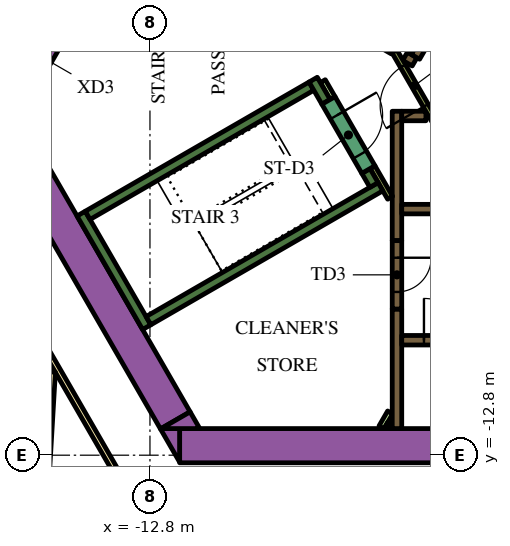
"""IFC4 building model, lengths in metres.
Left out: names, types, materials, properties, quantities, classifications, styles, units other than length and angle.
Written with IfcOpenShell. Run it as: python <this file> out.ifc"""

import sys

from ifc_helpers import new_model, si_unit, direction, frame, frame_2d, origin, place, context, subcontext, project, spatial, polyline, rectangle, outline, extrude, element, fill, save


model = new_model("IFC4")
c1 = context("Model", 3, precision=1e-05, world=origin(), true_north=direction((0.0, 1.0)))
c2 = subcontext(c1, "Body", "Model", "MODEL_VIEW")
j1 = project(units=[si_unit("LENGTHUNIT", "METRE"), si_unit("PLANEANGLEUNIT", "RADIAN")], contexts=[c1])
p1 = place(None, origin())
s1 = spatial("IfcSite", under=j1, at=p1, CompositionType="ELEMENT")
p2 = place(p1, origin())
s2 = spatial("IfcBuilding", under=s1, at=p2, CompositionType="ELEMENT")
p3 = place(p2, frame((0.0, 0.0, 114.9)))
s3 = spatial("IfcBuildingStorey", under=s2, at=p3, CompositionType="ELEMENT", Elevation=114.9)
p4 = place(p3, frame((-12.019, -12.55, 0.0), z_axis=(0.0, 0.0, 1.0), x_axis=(1.0, 0.0, 0.0)))
e1 = element("IfcWall", 1, at=p4, inside=s3, PredefinedType="SOLIDWALL", context=c2, shape_type="SweptSolid", body=[
    extrude(rectangle(XDim=22.083, YDim=0.9, at=frame_2d((11.042, 0.0))), origin(), (0.0, 0.0, 1.0), 3.9),
])
p5 = place(p3, origin())
e2 = element("IfcWall", 2, at=p5, inside=s3, PredefinedType="SOLIDWALL", context=c2, shape_type="SweptSolid", body=[
    extrude(outline(polyline([(-12.529, -12.1), (-12.021, -12.1), (-12.021, -12.98), (-12.529, -12.1)])), origin(), (0.0, 0.0, 1.0), 3.9),
])
p6 = place(p3, frame((-12.134, -11.883, 0.0), z_axis=(0.0, 0.0, 1.0), x_axis=(-0.500005339912, 0.866022320763, 0.0)))
e3 = element("IfcWall", 3, at=p6, inside=s3, PredefinedType="SOLIDWALL", context=c2, shape_type="SweptSolid", body=[
    extrude(rectangle(XDim=9.488, YDim=0.9, at=frame_2d((4.744, 0.0))), origin(), (0.0, 0.0, 1.0), 3.9),
])
e4 = element("IfcWall", 4, at=p5, inside=s3, PredefinedType="SOLIDWALL", context=c2, shape_type="SweptSolid", body=[
    extrude(outline(polyline([(-11.489, -12.1), (-12.505, -12.1), (-11.743, -11.66), (-11.489, -12.1)])), origin(), (0.0, 0.0, 1.0), 3.9),
])
p7 = place(p3, frame((-12.885, -9.431, 0.0), z_axis=(0.0, 0.0, 1.0), x_axis=(-0.500020560727, 0.866013532718, 0.0)))
e5 = element("IfcWall", 5, at=p7, inside=s3, PredefinedType="SOLIDWALL", context=c2, shape_type="SweptSolid", body=[
    extrude(rectangle(XDim=3.45, YDim=0.25, at=frame_2d((1.725, 0.0))), origin(), (0.0, 0.0, 1.0), 3.9),
])
p8 = place(p3, frame((-14.44, -6.49, 0.0), z_axis=(0.0, 0.0, 1.0), x_axis=(0.866022966069, 0.500004222222, 0.0)))
e6 = element("IfcWall", 6, at=p8, inside=s3, PredefinedType="SOLIDWALL", context=c2, shape_type="SweptSolid", body=[
    extrude(rectangle(XDim=6.8, YDim=0.25, at=frame_2d((3.4, 0.0))), origin(), (0.0, 0.0, 1.0), 3.9),
])
p9 = place(p3, frame((-8.168, -3.503, 0.0), z_axis=(0.0, 0.0, 1.0), x_axis=(-0.499952099219, 0.866053057547, 0.0)))
e7 = element("IfcWall", 7, at=p9, inside=s3, PredefinedType="SOLIDWALL", context=c2, shape_type="SweptSolid", body=[
    extrude(rectangle(XDim=0.675, YDim=0.25, at=frame_2d((0.337, 0.0))), origin(), (0.0, 0.0, 1.0), 3.9),
])
p10 = place(p3, frame((-12.84, -9.261, 0.0), z_axis=(0.0, 0.0, 1.0), x_axis=(0.866016039709, 0.500016218704, 0.0)))
e8 = element("IfcWall", 8, at=p10, inside=s3, PredefinedType="SOLIDWALL", context=c2, shape_type="SweptSolid", body=[
    extrude(rectangle(XDim=7.05, YDim=0.25, at=frame_2d((3.525, 0.0))), origin(), (0.0, 0.0, 1.0), 3.9),
])
p11 = place(p3, frame((-6.905, -5.69, 0.0), z_axis=(0.0, 0.0, 1.0), x_axis=(-0.500402024738, 0.865793170242, 0.0)))
e9 = element("IfcWall", 9, at=p11, inside=s3, PredefinedType="SOLIDWALL", context=c2, shape_type="SweptSolid", body=[
    extrude(rectangle(XDim=0.425, YDim=0.25, at=frame_2d((0.212, 0.0))), origin(), (0.0, 0.0, 1.0), 3.9),
])
p12 = place(p3, frame((-6.3, -12.1, 0.0), z_axis=(0.0, 0.0, 1.0), x_axis=(0.0, 1.0, 0.0)))
e10 = element("IfcWall", 10, at=p12, inside=s3, PredefinedType="SOLIDWALL", context=c2, shape_type="SweptSolid", body=[
    extrude(rectangle(XDim=3.146, YDim=0.25, at=frame_2d((1.573, 0.0))), origin(), (0.0, 0.0, 1.0), 3.9),
])
p13 = place(p3, frame((-6.3, -3.75, 0.0), z_axis=(0.0, 0.0, 1.0), x_axis=(0.0, -1.0, 0.0)))
e11 = element("IfcWall", 11, at=p13, inside=s3, PredefinedType="SOLIDWALL", context=c2, shape_type="SweptSolid", body=[
    extrude(rectangle(XDim=3.404, YDim=0.25, at=frame_2d((1.702, 0.0))), origin(), (0.0, 0.0, 1.0), 3.9),
])
p14 = place(p3, frame((-6.175, -3.875, 0.0), z_axis=(0.0, 0.0, 1.0), x_axis=(1.0, 0.0, 0.0)))
e12 = element("IfcWall", 12, at=p14, inside=s3, PredefinedType="SOLIDWALL", context=c2, shape_type="SweptSolid", body=[
    extrude(rectangle(XDim=0.637, YDim=0.25, at=frame_2d((0.318, 0.0))), origin(), (0.0, 0.0, 1.0), 3.9),
])
p15 = place(p3, frame((-6.088, -2.305, 0.0), z_axis=(0.0, 0.0, 1.0), x_axis=(0.866059450854, -0.499941024108, 0.0)))
e13 = element("IfcWall", 13, at=p15, inside=s3, PredefinedType="SOLIDWALL", context=c2, shape_type="SweptSolid", body=[
    extrude(rectangle(XDim=0.29, YDim=0.25, at=frame_2d((0.145, 0.0))), origin(), (0.0, 0.0, 1.0), 3.9),
])
p16 = place(p3, frame((-7.889, -1.265, 0.0), z_axis=(0.0, 0.0, 1.0), x_axis=(0.865986741702, -0.500066958712, 0.0)))
e14 = element("IfcWall", 14, at=p16, inside=s3, PredefinedType="SOLIDWALL", context=c2, shape_type="SweptSolid", body=[
    extrude(rectangle(XDim=1.738, YDim=0.25, at=frame_2d((0.869, 0.0))), origin(), (0.0, 0.0, 1.0), 3.9),
])
p17 = place(p3, frame((-6.708, -12.068, 0.0), z_axis=(0.0, 0.0, 1.0), x_axis=(0.500000789788, 0.8660249478, 0.0)))
e15 = element("IfcWall", 15, at=p17, inside=s3, PredefinedType="PARTITIONING", context=c2, shape_type="SweptSolid", body=[
    extrude(rectangle(XDim=0.456, YDim=0.15, at=frame_2d((0.228, 0.0))), origin(), (0.0, 0.0, 1.0), 2.75),
])
p18 = place(p3, frame((-6.534, -12.068, 0.0), z_axis=(0.0, 0.0, 1.0), x_axis=(0.500240224089, 0.865886665912, 0.0)))
e16 = element("IfcWall", 16, at=p18, inside=s3, PredefinedType="PARTITIONING", context=c2, shape_type="SweptSolid", body=[
    extrude(rectangle(XDim=0.109, YDim=0.15, at=frame_2d((0.054, 0.0))), origin(), (0.0, 0.0, 1.0), 2.75),
])
p19 = place(p3, frame((-6.48, -6.027, 0.0), z_axis=(0.0, 0.0, 1.0), x_axis=(-0.499927229454, 0.866067413802, 0.0)))
e17 = element("IfcWall", 17, at=p19, inside=s3, PredefinedType="PARTITIONING", context=c2, shape_type="SweptSolid", body=[
    extrude(rectangle(XDim=0.929, YDim=0.15, at=frame_2d((0.464, 0.0))), origin(), (0.0, 0.0, 1.0), 3.9),
])
p20 = place(p3, frame((-8.252, -2.958, 0.0), z_axis=(0.0, 0.0, 1.0), x_axis=(0.500174715838, -0.865924508047, 0.0)))
e18 = element("IfcWall", 18, at=p20, inside=s3, PredefinedType="PARTITIONING", context=c2, shape_type="SweptSolid", body=[
    extrude(rectangle(XDim=0.514, YDim=0.15, at=frame_2d((0.257, 0.0))), origin(), (0.0, 0.0, 1.0), 2.75),
])
p21 = place(p3, frame((-6.175, -9.775, 0.0), z_axis=(0.0, 0.0, 1.0), x_axis=(1.0, 0.0, 0.0)))
e19 = element("IfcWall", 19, at=p21, inside=s3, PredefinedType="SOLIDWALL", context=c2, shape_type="SweptSolid", body=[
    extrude(rectangle(XDim=12.35, YDim=0.25, at=frame_2d((6.175, 0.0))), origin(), (0.0, 0.0, 1.0), 3.9),
])
p22 = place(p21, frame((0.585, 0.0, 0.0)))
e20 = element("IfcOpeningElement", 20, at=p22, cuts=e19, PredefinedType="OPENING", context=c2, shape_type="SweptSolid", body=[
    extrude(rectangle(XDim=1.1, YDim=2.1, at=frame_2d((0.55, 1.05))), frame((0.0, 0.135, 0.0), z_axis=(0.0, -1.0, 0.0), x_axis=(1.0, 0.0, 0.0)), (0.0, 0.0, 1.0), 0.27),
])
p23 = place(p21, frame((3.105, 0.0, 0.0)))
e21 = element("IfcOpeningElement", 21, at=p23, cuts=e19, PredefinedType="OPENING", context=c2, shape_type="SweptSolid", body=[
    extrude(rectangle(XDim=1.1, YDim=2.1, at=frame_2d((0.55, 1.05))), frame((0.0, 0.135, 0.0), z_axis=(0.0, -1.0, 0.0), x_axis=(1.0, 0.0, 0.0)), (0.0, 0.0, 1.0), 0.27),
])
p24 = place(p21, frame((5.625, 0.0, 0.0)))
e22 = element("IfcOpeningElement", 22, at=p24, cuts=e19, PredefinedType="OPENING", context=c2, shape_type="SweptSolid", body=[
    extrude(rectangle(XDim=1.1, YDim=2.1, at=frame_2d((0.55, 1.05))), frame((0.0, 0.135, 0.0), z_axis=(0.0, -1.0, 0.0), x_axis=(1.0, 0.0, 0.0)), (0.0, 0.0, 1.0), 0.27),
])
p25 = place(p21, frame((8.145, 0.0, 0.0)))
e23 = element("IfcOpeningElement", 23, at=p25, cuts=e19, PredefinedType="OPENING", context=c2, shape_type="SweptSolid", body=[
    extrude(rectangle(XDim=1.1, YDim=2.1, at=frame_2d((0.55, 1.05))), frame((0.0, 0.135, 0.0), z_axis=(0.0, -1.0, 0.0), x_axis=(1.0, 0.0, 0.0)), (0.0, 0.0, 1.0), 0.27),
])
p26 = place(p21, frame((10.665, 0.0, 0.0)))
e24 = element("IfcOpeningElement", 24, at=p26, cuts=e19, PredefinedType="OPENING", context=c2, shape_type="SweptSolid", body=[
    extrude(rectangle(XDim=1.1, YDim=2.1, at=frame_2d((0.55, 1.05))), frame((0.0, 0.135, 0.0), z_axis=(0.0, -1.0, 0.0), x_axis=(1.0, 0.0, 0.0)), (0.0, 0.0, 1.0), 0.27),
])
p27 = place(p3, frame((-6.175, -6.325, 0.0), z_axis=(0.0, 0.0, 1.0), x_axis=(1.0, 0.0, 0.0)))
e25 = element("IfcWall", 25, at=p27, inside=s3, PredefinedType="SOLIDWALL", context=c2, shape_type="SweptSolid", body=[
    extrude(rectangle(XDim=12.35, YDim=0.25, at=frame_2d((6.175, 0.0))), origin(), (0.0, 0.0, 1.0), 3.9),
])
p28 = place(p27, frame((3.205, 0.0, 0.0)))
e26 = element("IfcOpeningElement", 26, at=p28, cuts=e25, PredefinedType="OPENING", context=c2, shape_type="SweptSolid", body=[
    extrude(rectangle(XDim=0.9, YDim=2.1, at=frame_2d((0.45, 1.05))), frame((0.0, 0.135, 0.0), z_axis=(0.0, -1.0, 0.0), x_axis=(1.0, 0.0, 0.0)), (0.0, 0.0, 1.0), 0.27),
])
p29 = place(p27, frame((8.145, 0.0, 0.0)))
e27 = element("IfcOpeningElement", 27, at=p29, cuts=e25, PredefinedType="OPENING", context=c2, shape_type="SweptSolid", body=[
    extrude(rectangle(XDim=1.1, YDim=2.1, at=frame_2d((0.55, 1.05))), frame((0.0, 0.135, 0.0), z_axis=(0.0, -1.0, 0.0), x_axis=(1.0, 0.0, 0.0)), (0.0, 0.0, 1.0), 0.27),
])
p30 = place(p27, frame((10.665, 0.0, 0.0)))
e28 = element("IfcOpeningElement", 28, at=p30, cuts=e25, PredefinedType="OPENING", context=c2, shape_type="SweptSolid", body=[
    extrude(rectangle(XDim=1.1, YDim=2.1, at=frame_2d((0.55, 1.05))), frame((0.0, 0.135, 0.0), z_axis=(0.0, -1.0, 0.0), x_axis=(1.0, 0.0, 0.0)), (0.0, 0.0, 1.0), 0.27),
])
p31 = place(p3, frame((-0.898, 6.194, 0.0), z_axis=(0.0, 0.0, 1.0), x_axis=(-0.499996202215, -0.866027596426, 0.0)))
e29 = element("IfcWall", 29, at=p31, inside=s3, PredefinedType="SOLIDWALL", context=c2, shape_type="SweptSolid", body=[
    extrude(rectangle(XDim=9.83, YDim=0.25, at=frame_2d((4.915, 0.0))), origin(), (0.0, 0.0, 1.0), 3.9),
])
p32 = place(p31, frame((0.585, 0.0, 0.0)))
e30 = element("IfcOpeningElement", 30, at=p32, cuts=e29, PredefinedType="OPENING", context=c2, shape_type="SweptSolid", body=[
    extrude(rectangle(XDim=1.1, YDim=2.1, at=frame_2d((0.55, 1.05))), frame((0.0, 0.135, 0.0), z_axis=(0.0, -1.0, 0.0), x_axis=(1.0, 0.0, 0.0)), (0.0, 0.0, 1.0), 0.27),
])
p33 = place(p31, frame((3.105, 0.0, 0.0)))
e31 = element("IfcOpeningElement", 31, at=p33, cuts=e29, PredefinedType="OPENING", context=c2, shape_type="SweptSolid", body=[
    extrude(rectangle(XDim=1.1, YDim=2.1, at=frame_2d((0.55, 1.05))), frame((0.0, 0.135, 0.0), z_axis=(0.0, -1.0, 0.0), x_axis=(1.0, 0.0, 0.0)), (0.0, 0.0, 1.0), 0.27),
])
p34 = place(p31, frame((5.625, 0.0, 0.0)))
e32 = element("IfcOpeningElement", 32, at=p34, cuts=e29, PredefinedType="OPENING", context=c2, shape_type="SweptSolid", body=[
    extrude(rectangle(XDim=1.1, YDim=2.1, at=frame_2d((0.55, 1.05))), frame((0.0, 0.135, 0.0), z_axis=(0.0, -1.0, 0.0), x_axis=(1.0, 0.0, 0.0)), (0.0, 0.0, 1.0), 0.27),
])
p35 = place(p31, frame((8.145, 0.0, 0.0)))
e33 = element("IfcOpeningElement", 33, at=p35, cuts=e29, PredefinedType="OPENING", context=c2, shape_type="SweptSolid", body=[
    extrude(rectangle(XDim=1.1, YDim=2.1, at=frame_2d((0.55, 1.05))), frame((0.0, 0.135, 0.0), z_axis=(0.0, -1.0, 0.0), x_axis=(1.0, 0.0, 0.0)), (0.0, 0.0, 1.0), 0.27),
])
p36 = place(p3, frame((-8.103, -3.466, 0.0), z_axis=(0.0, 0.0, 1.0), x_axis=(0.500078061341, -0.865980330357, 0.0)))
e34 = element("IfcWall", 34, at=p36, inside=s3, PredefinedType="SOLIDWALL", context=c2, shape_type="SweptSolid", body=[
    extrude(rectangle(XDim=2.1, YDim=0.4, at=frame_2d((1.05, 0.0))), origin(), (0.0, 0.0, 1.0), 3.9),
])
p37 = place(p36, frame((0.45, 0.0, 0.0)))
e35 = element("IfcOpeningElement", 35, at=p37, cuts=e34, PredefinedType="OPENING", context=c2, shape_type="SweptSolid", body=[
    extrude(rectangle(XDim=1.2, YDim=2.1, at=frame_2d((0.6, 1.05))), frame((0.0, 0.21, 0.0), z_axis=(0.0, -1.0, 0.0), x_axis=(1.0, 0.0, 0.0)), (0.0, 0.0, 1.0), 0.42),
])
p38 = place(p3, frame((-6.3, -7.154, 0.0), z_axis=(0.0, 0.0, 1.0), x_axis=(0.0, -1.0, 0.0)))
e36 = element("IfcWall", 36, at=p38, inside=s3, PredefinedType="SOLIDWALL", context=c2, shape_type="SweptSolid", body=[
    extrude(rectangle(XDim=1.8, YDim=0.25, at=frame_2d((0.9, 0.0))), origin(), (0.0, 0.0, 1.0), 3.9),
])
p39 = place(p38, frame((0.45, 0.0, 0.0)))
e37 = element("IfcOpeningElement", 37, at=p39, cuts=e36, PredefinedType="OPENING", context=c2, shape_type="SweptSolid", body=[
    extrude(rectangle(XDim=0.9, YDim=2.1, at=frame_2d((0.45, 1.05))), frame((0.0, 0.135, 0.0), z_axis=(0.0, -1.0, 0.0), x_axis=(1.0, 0.0, 0.0)), (0.0, 0.0, 1.0), 0.27),
])
p40 = place(p3, frame((-5.317, -3.99, 0.0), z_axis=(0.0, 0.0, 1.0), x_axis=(-0.500027713859, 0.866009402589, 0.0)))
e38 = element("IfcWall", 38, at=p40, inside=s3, PredefinedType="PARTITIONING", context=c2, shape_type="SweptSolid", body=[
    extrude(rectangle(XDim=2.1, YDim=0.15, at=frame_2d((1.05, 0.0))), origin(), (0.0, 0.0, 1.0), 3.9),
])
p41 = place(p40, frame((0.45, 0.0, 0.0)))
e39 = element("IfcOpeningElement", 39, at=p41, cuts=e38, PredefinedType="OPENING", context=c2, shape_type="SweptSolid", body=[
    extrude(rectangle(XDim=1.2, YDim=2.1, at=frame_2d((0.6, 1.05))), frame((0.0, 0.085, 0.0), z_axis=(0.0, -1.0, 0.0), x_axis=(1.0, 0.0, 0.0)), (0.0, 0.0, 1.0), 0.17),
])
p42 = place(p3, frame((-16.209, -2.976, 0.0), z_axis=(0.0, 0.0, 1.0), x_axis=(0.499954529098, 0.86605165483, 0.0)))
e40 = element("IfcWall", 40, at=p42, inside=s3, PredefinedType="SOLIDWALL", context=c2, shape_type="SweptSolid", body=[
    extrude(rectangle(XDim=1.7, YDim=0.9, at=frame_2d((0.85, 0.0))), origin(), (0.0, 0.0, 1.0), 3.9),
])
p43 = place(p42, frame((0.25, 0.0, 0.0)))
e41 = element("IfcOpeningElement", 41, at=p43, cuts=e40, PredefinedType="OPENING", context=c2, shape_type="SweptSolid", body=[
    extrude(rectangle(XDim=1.2, YDim=2.1, at=frame_2d((0.6, 1.05))), frame((0.0, 0.46, 0.0), z_axis=(0.0, -1.0, 0.0), x_axis=(1.0, 0.0, 0.0)), (0.0, 0.0, 1.0), 0.92),
])
p44 = place(p3, frame((-19.081, -3.9, 0.0), z_axis=(0.0, 0.0, 1.0), x_axis=(0.499998313975, 0.866026377209, 0.0)))
e42 = element("IfcWall", 42, at=p44, inside=s3, PredefinedType="PARTITIONING", context=c2, shape_type="SweptSolid", body=[
    extrude(rectangle(XDim=25.766, YDim=0.15, at=frame_2d((12.883, 0.0))), origin(), (0.0, 0.0, 1.0), 2.75),
])
p45 = place(p44, frame((19.306, 0.0, 0.0)))
e43 = element("IfcOpeningElement", 43, at=p45, cuts=e42, PredefinedType="OPENING", context=c2, shape_type="SweptSolid", body=[
    extrude(rectangle(XDim=1.0, YDim=2.1, at=frame_2d((0.5, 1.05))), frame((0.0, 0.085, 0.0), z_axis=(0.0, -1.0, 0.0), x_axis=(1.0, 0.0, 0.0)), (0.0, 0.0, 1.0), 0.17),
])
p46 = place(p44, frame((18.0, 0.0, 0.0)))
e44 = element("IfcOpeningElement", 44, at=p46, cuts=e42, PredefinedType="OPENING", context=c2, shape_type="SweptSolid", body=[
    extrude(rectangle(XDim=1.0, YDim=2.1, at=frame_2d((0.5, 1.05))), frame((0.0, 0.085, 0.0), z_axis=(0.0, -1.0, 0.0), x_axis=(1.0, 0.0, 0.0)), (0.0, 0.0, 1.0), 0.17),
])
p47 = place(p44, frame((6.838, 0.0, 0.0)))
e45 = element("IfcOpeningElement", 45, at=p47, cuts=e42, PredefinedType="OPENING", context=c2, shape_type="SweptSolid", body=[
    extrude(rectangle(XDim=1.0, YDim=2.1, at=frame_2d((0.5, 1.05))), frame((0.0, 0.085, 0.0), z_axis=(0.0, -1.0, 0.0), x_axis=(1.0, 0.0, 0.0)), (0.0, 0.0, 1.0), 0.17),
])
p48 = place(p44, frame((4.674, 0.0, 0.0)))
e46 = element("IfcOpeningElement", 46, at=p48, cuts=e42, PredefinedType="OPENING", context=c2, shape_type="SweptSolid", body=[
    extrude(rectangle(XDim=0.9, YDim=2.1, at=frame_2d((0.45, 1.05))), frame((0.0, 0.085, 0.0), z_axis=(0.0, -1.0, 0.0), x_axis=(1.0, 0.0, 0.0)), (0.0, 0.0, 1.0), 0.17),
])
p49 = place(p44, frame((0.18, 0.0, 0.0)))
e47 = element("IfcOpeningElement", 47, at=p49, cuts=e42, PredefinedType="OPENING", context=c2, shape_type="SweptSolid", body=[
    extrude(rectangle(XDim=1.0, YDim=2.1, at=frame_2d((0.5, 1.05))), frame((0.0, 0.085, 0.0), z_axis=(0.0, -1.0, 0.0), x_axis=(1.0, 0.0, 0.0)), (0.0, 0.0, 1.0), 0.17),
])
p50 = place(p3, frame((-12.918, -14.575, 0.0), z_axis=(0.0, 0.0, 1.0), x_axis=(-0.500009150678, 0.866020120573, 0.0)))
e48 = element("IfcWall", 48, at=p50, inside=s3, PredefinedType="PARTITIONING", context=c2, shape_type="SweptSolid", body=[
    extrude(rectangle(XDim=5.258, YDim=0.15, at=frame_2d((2.629, 0.0))), origin(), (0.0, 0.0, 1.0), 2.75),
])
p51 = place(p3, frame((-15.999, -21.467, 0.0), z_axis=(0.0, 0.0, 1.0), x_axis=(0.058411453297, 0.998292593443, 0.0)))
e49 = element("IfcWall", 49, at=p51, inside=s3, PredefinedType="PARTITIONING", context=c2, shape_type="SweptSolid", body=[
    extrude(rectangle(XDim=10.875, YDim=0.15, at=frame_2d((5.438, 0.0))), origin(), (0.0, 0.0, 1.0), 2.75),
])
p52 = place(p22, origin())
e50 = element("IfcDoor", 50, at=p52, inside=s3, OperationType="DOUBLE_DOOR_SLIDING", PredefinedType="DOOR", context=c2, shape_type="SweptSolid", body=[
    extrude(rectangle(XDim=1.1, YDim=2.1, at=frame_2d((0.55, 1.05))), frame((0.0, 0.025, 0.0), z_axis=(0.0, -1.0, 0.0), x_axis=(1.0, 0.0, 0.0)), (0.0, 0.0, 1.0), 0.05),
])
fill(e20, e50)
p53 = place(p37, origin())
e51 = element("IfcDoor", 51, at=p53, inside=s3, OperationType="SINGLE_SWING_LEFT", PredefinedType="DOOR", context=c2, shape_type="SweptSolid", body=[
    extrude(rectangle(XDim=1.2, YDim=2.1, at=frame_2d((0.6, 1.05))), frame((0.0, 0.025, 0.0), z_axis=(0.0, -1.0, 0.0), x_axis=(1.0, 0.0, 0.0)), (0.0, 0.0, 1.0), 0.05),
])
fill(e35, e51)
p54 = place(p39, origin())
e52 = element("IfcDoor", 52, at=p54, inside=s3, OperationType="SINGLE_SWING_LEFT", PredefinedType="DOOR", context=c2, shape_type="SweptSolid", body=[
    extrude(rectangle(XDim=0.9, YDim=2.1, at=frame_2d((0.45, 1.05))), frame((0.0, 0.025, 0.0), z_axis=(0.0, -1.0, 0.0), x_axis=(1.0, 0.0, 0.0)), (0.0, 0.0, 1.0), 0.05),
])
fill(e37, e52)
p55 = place(p41, origin())
e53 = element("IfcDoor", 53, at=p55, inside=s3, OperationType="SINGLE_SWING_LEFT", PredefinedType="DOOR", context=c2, shape_type="SweptSolid", body=[
    extrude(rectangle(XDim=1.2, YDim=2.1, at=frame_2d((0.6, 1.05))), frame((0.0, 0.025, 0.0), z_axis=(0.0, -1.0, 0.0), x_axis=(1.0, 0.0, 0.0)), (0.0, 0.0, 1.0), 0.05),
])
fill(e39, e53)
save(model, sys.argv[1])
